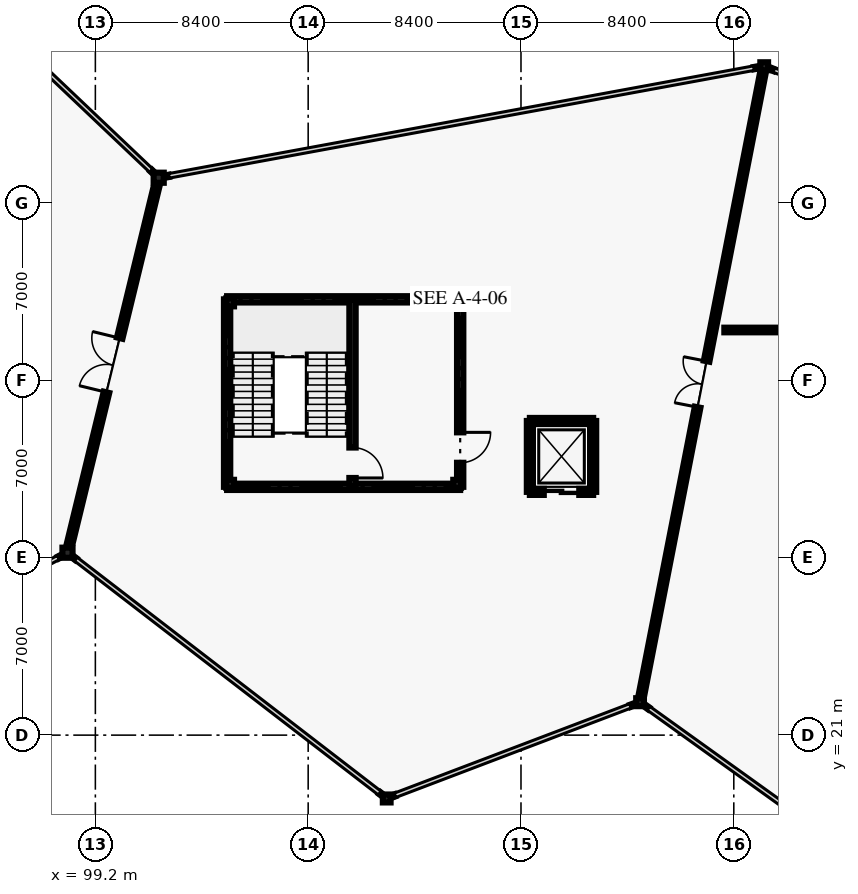
"""IFC4 building model, lengths in metres.
Left out: names, types, materials, properties, quantities, classifications, styles, units other than length and angle.
Written with IfcOpenShell. Run it as: python <this file> out.ifc"""

import sys

from ifc_helpers import new_model, si_unit, direction, frame, frame_2d, origin, origin_2d, place, context, subcontext, project, spatial, rectangle, i_section, extrude, element, fill, save


model = new_model("IFC4")
c1 = context("Model", 3, precision=1e-05, world=origin(), true_north=direction((0.0, 1.0)))
c2 = subcontext(c1, "Body", "Model", "MODEL_VIEW")
j1 = project(units=[si_unit("LENGTHUNIT", "METRE"), si_unit("PLANEANGLEUNIT", "RADIAN")], contexts=[c1])
p1 = place(None, origin())
s1 = spatial("IfcSite", under=j1, at=p1, CompositionType="ELEMENT")
p2 = place(p1, origin())
s2 = spatial("IfcBuilding", under=s1, at=p2, CompositionType="ELEMENT")
p3 = place(p2, frame((0.0, 0.0, 5.4)))
s3 = spatial("IfcBuildingStorey", under=s2, at=p3, CompositionType="ELEMENT", Elevation=5.4)
for number, where, z_axis, x_axis in (
    (1, (98.1, 28.2, 0.0), (0.0, 0.0, 1.0), (1.0, 0.0, 0.0)),
    (2, (101.7, 43.0, 0.0), (0.0, 0.0, 1.0), (1.0, 0.0, 0.0)),
):
    element("IfcColumn", number, at=place(p3, frame(where, z_axis=z_axis, x_axis=x_axis)), inside=s3, PredefinedType="COLUMN", context=c2, shape_type="SweptSolid", body=[
        extrude(i_section(OverallWidth=0.4, OverallDepth=0.4, WebThickness=0.022, FlangeThickness=0.036, at=origin_2d()), origin(), (0.0, 0.0, 1.0), 4.8),
    ])
for number, where, z_axis, x_axis in (
    (3, (110.7, 18.5, 0.0), (0.0, 0.0, 1.0), (1.0, 0.0, 0.0)),
    (4, (120.7, 22.3, 0.0), (0.0, 0.0, 1.0), (1.0, 0.0, 0.0)),
    (5, (125.6, 47.4, 0.0), (0.0, 0.0, 1.0), (1.0, 0.0, 0.0)),
    (6, (104.52, 30.92, 0.0), (0.0, 0.0, 1.0), (1.0, 0.0, 0.0)),
    (7, (113.48, 30.92, 0.0), (0.0, 0.0, 1.0), (1.0, 0.0, 0.0)),
    (8, (113.48, 38.08, 0.0), (0.0, 0.0, 1.0), (1.0, 0.0, 0.0)),
    (9, (104.52, 38.08, 0.0), (0.0, 0.0, 1.0), (1.0, 0.0, 0.0)),
):
    element("IfcColumn", number, at=place(p3, frame(where, z_axis=z_axis, x_axis=x_axis)), inside=s3, PredefinedType="COLUMN", context=c2, shape_type="SweptSolid", body=[
        extrude(i_section(OverallWidth=0.307, OverallDepth=0.315, WebThickness=0.012, FlangeThickness=0.019, FilletRadius=0.017, at=origin_2d()), origin(), (0.0, 0.0, 1.0), 4.8),
    ])
p4 = place(p3, frame((98.01, 28.152, 0.0), z_axis=(0.0, 0.0, 1.0), x_axis=(-0.885021600209, -0.465549962049, 0.0)))
e10 = element("IfcWall", 10, at=p4, inside=s3, PredefinedType="SOLIDWALL", context=c2, shape_type="SweptSolid", body=[
    extrude(rectangle(XDim=0.307, YDim=0.095, at=frame_2d((0.154, 0.0))), origin(), (0.0, 0.0, 1.0), 3.62),
])
p5 = place(p3, frame((101.403, 43.282, 0.0), z_axis=(0.0, 0.0, 1.0), x_axis=(0.726243974232, -0.687437044311, 0.0)))
e11 = element("IfcWall", 11, at=p5, inside=s3, PredefinedType="SOLIDWALL", context=c2, shape_type="SweptSolid", body=[
    extrude(rectangle(XDim=0.308, YDim=0.095, at=frame_2d((0.154, 0.0))), origin(), (0.0, 0.0, 1.0), 3.62),
])
p6 = place(p3, frame((110.667, 18.526, 0.0), z_axis=(0.0, 0.0, 1.0), x_axis=(-0.79356800352, 0.608481572268, 0.0)))
e12 = element("IfcWall", 12, at=p6, inside=s3, PredefinedType="SOLIDWALL", context=c2, shape_type="SweptSolid", body=[
    extrude(rectangle(XDim=0.307, YDim=0.095, at=frame_2d((0.154, 0.0))), origin(), (0.0, 0.0, 1.0), 3.62),
])
p7 = place(p3, frame((98.424, 27.95, 0.0), z_axis=(0.0, 0.0, 1.0), x_axis=(-0.793861838141, 0.608098168016, 0.0)))
e13 = element("IfcWall", 13, at=p7, inside=s3, PredefinedType="SOLIDWALL", context=c2, shape_type="SweptSolid", body=[
    extrude(rectangle(XDim=0.308, YDim=0.095, at=frame_2d((0.154, 0.0))), origin(), (0.0, 0.0, 1.0), 3.62),
])
p8 = place(p3, frame((120.605, 22.264, 0.0), z_axis=(0.0, 0.0, 1.0), x_axis=(-0.935413842844, -0.353554723651, 0.0)))
e14 = element("IfcWall", 14, at=p8, inside=s3, PredefinedType="SOLIDWALL", context=c2, shape_type="SweptSolid", body=[
    extrude(rectangle(XDim=0.308, YDim=0.095, at=frame_2d((0.154, 0.0))), origin(), (0.0, 0.0, 1.0), 3.62),
])
p9 = place(p3, frame((111.027, 18.624, 0.0), z_axis=(0.0, 0.0, 1.0), x_axis=(-0.935151489811, -0.354248064361, 0.0)))
e15 = element("IfcWall", 15, at=p9, inside=s3, PredefinedType="SOLIDWALL", context=c2, shape_type="SweptSolid", body=[
    extrude(rectangle(XDim=0.308, YDim=0.095, at=frame_2d((0.154, 0.0))), origin(), (0.0, 0.0, 1.0), 3.62),
])
for number, where, z_axis, x_axis in (
    (16, (101.8, 43.019, 0.0), (0.0, 0.0, 1.0), (0.984, 0.178, 0.0)),
    (17, (125.193, 47.325, 0.0), (0.0, 0.0, 1.0), (0.984, 0.178, 0.0)),
):
    element("IfcWall", number, at=place(p3, frame(where, z_axis=z_axis, x_axis=x_axis)), inside=s3, PredefinedType="SOLIDWALL", context=c2, shape_type="SweptSolid", body=[
        extrude(rectangle(XDim=0.308, YDim=0.095, at=frame_2d((0.154, 0.0))), origin(), (0.0, 0.0, 1.0), 3.62),
    ])
p10 = place(p3, frame((125.696, 47.363, 0.0), z_axis=(0.0, 0.0, 1.0), x_axis=(0.929292597209, -0.369344376933, 0.0)))
e18 = element("IfcWall", 18, at=p10, inside=s3, PredefinedType="SOLIDWALL", context=c2, shape_type="SweptSolid", body=[
    extrude(rectangle(XDim=0.309, YDim=0.095, at=frame_2d((0.154, 0.0))), origin(), (0.0, 0.0, 1.0), 3.62),
])
p11 = place(p3, frame((121.033, 22.061, 0.0), z_axis=(0.0, 0.0, 1.0), x_axis=(-0.811639565077, 0.584158554162, 0.0)))
e19 = element("IfcWall", 19, at=p11, inside=s3, PredefinedType="SOLIDWALL", context=c2, shape_type="SweptSolid", body=[
    extrude(rectangle(XDim=0.308, YDim=0.095, at=frame_2d((0.154, 0.0))), origin(), (0.0, 0.0, 1.0), 3.62),
])
p12 = place(p3, frame((98.1, 28.2, 0.0), z_axis=(0.0, 0.0, 1.0), x_axis=(0.236341762997, 0.971669990822, 0.0)))
e20 = element("IfcWall", 20, at=p12, inside=s3, PredefinedType="SOLIDWALL", context=c2, shape_type="SweptSolid", body=[
    extrude(rectangle(XDim=15.231, YDim=0.225, at=frame_2d((7.616, 0.0))), origin(), (0.0, 0.0, 1.0), 4.02),
])
p13 = place(p12, frame((6.516, 0.0, 0.0)))
e21 = element("IfcOpeningElement", 21, at=p13, cuts=e20, PredefinedType="OPENING", context=c2, shape_type="SweptSolid", body=[
    extrude(rectangle(XDim=2.2, YDim=2.6, at=frame_2d((1.1, 1.3))), frame((0.0, 0.123, 0.0), z_axis=(0.0, -1.0, 0.0), x_axis=(1.0, 0.0, 0.0)), (0.0, 0.0, 1.0), 0.245),
])
p14 = place(p3, frame((120.7, 22.3, 0.0), z_axis=(0.0, 0.0, 1.0), x_axis=(0.191608827438, 0.981471373626, 0.0)))
e22 = element("IfcWall", 22, at=p14, inside=s3, PredefinedType="SOLIDWALL", context=c2, shape_type="SweptSolid", body=[
    extrude(rectangle(XDim=25.574, YDim=0.225, at=frame_2d((12.787, 0.0))), origin(), (0.0, 0.0, 1.0), 4.02),
])
p15 = place(p14, frame((11.862, 0.0, 0.0)))
e23 = element("IfcOpeningElement", 23, at=p15, cuts=e22, PredefinedType="OPENING", context=c2, shape_type="SweptSolid", body=[
    extrude(rectangle(XDim=1.85, YDim=2.4, at=frame_2d((0.925, 1.2))), frame((0.0, 0.123, 0.0), z_axis=(0.0, -1.0, 0.0), x_axis=(1.0, 0.0, 0.0)), (0.0, 0.0, 1.0), 0.245),
])
p16 = place(p3, frame((124.026, 36.99, 0.0), z_axis=(0.0, 0.0, 1.0), x_axis=(1.0, 0.0, 0.0)))
e24 = element("IfcWall", 24, at=p16, inside=s3, PredefinedType="PARTITIONING", context=c2, shape_type="SweptSolid", body=[
    extrude(rectangle(XDim=14.812, YDim=0.185, at=frame_2d((7.406, 0.0))), origin(), (0.0, 0.0, 1.0), 3.32),
])
p17 = place(p16, frame((6.881, 0.0, 0.0)))
e25 = element("IfcOpeningElement", 25, at=p17, cuts=e24, PredefinedType="OPENING", context=c2, shape_type="SweptSolid", body=[
    extrude(rectangle(XDim=1.05, YDim=2.2, at=frame_2d((0.525, 1.1))), frame((0.0, 0.103, 0.0), z_axis=(0.0, -1.0, 0.0), x_axis=(1.0, 0.0, 0.0)), (0.0, 0.0, 1.0), 0.205),
])
p18 = place(p3, frame((104.4, 30.8, 0.0), z_axis=(0.0, 0.0, 1.0), x_axis=(0.0, 1.0, 0.0)))
e26 = element("IfcWall", 26, at=p18, inside=s3, PredefinedType="SHEAR", context=c2, shape_type="SweptSolid", body=[
    extrude(rectangle(XDim=7.4, YDim=0.25, at=frame_2d((3.7, 0.0))), origin(), (0.0, 0.0, 1.0), 4.56),
])
for number, where, z_axis, x_axis in (
    (27, (104.4, 38.2, 0.0), (0.0, 0.0, 1.0), (1.0, 0.0, 0.0)),
    (28, (113.6, 30.8, 0.0), (0.0, 0.0, 1.0), (-1.0, 0.0, 0.0)),
):
    element("IfcWall", number, at=place(p3, frame(where, z_axis=z_axis, x_axis=x_axis)), inside=s3, PredefinedType="SHEAR", context=c2, shape_type="SweptSolid", body=[
        extrude(rectangle(XDim=9.2, YDim=0.25, at=frame_2d((4.6, 0.0))), origin(), (0.0, 0.0, 1.0), 4.56),
    ])
p19 = place(p3, frame((113.6, 38.2, 0.0), z_axis=(0.0, 0.0, 1.0), x_axis=(0.0, -1.0, 0.0)))
e29 = element("IfcWall", 29, at=p19, inside=s3, PredefinedType="SHEAR", context=c2, shape_type="SweptSolid", body=[
    extrude(rectangle(XDim=7.4, YDim=0.25, at=frame_2d((3.7, 0.0))), origin(), (0.0, 0.0, 1.0), 4.56),
])
p20 = place(p19, frame((5.25, 0.0, 0.0)))
e30 = element("IfcOpeningElement", 30, at=p20, cuts=e29, PredefinedType="OPENING", context=c2, shape_type="SweptSolid", body=[
    extrude(rectangle(XDim=1.2, YDim=2.2, at=frame_2d((0.6, 1.1))), frame((0.0, 0.135, 0.0), z_axis=(0.0, -1.0, 0.0), x_axis=(1.0, 0.0, 0.0)), (0.0, 0.0, 1.0), 0.27),
])
p21 = place(p3, frame((109.35, 38.2, 0.0), z_axis=(0.0, 0.0, 1.0), x_axis=(0.0, -1.0, 0.0)))
e31 = element("IfcWall", 31, at=p21, inside=s3, PredefinedType="SHEAR", context=c2, shape_type="SweptSolid", body=[
    extrude(rectangle(XDim=7.4, YDim=0.25, at=frame_2d((3.7, 0.0))), origin(), (0.0, 0.0, 1.0), 4.56),
])
p22 = place(p21, frame((5.85, 0.0, 0.0)))
e32 = element("IfcOpeningElement", 32, at=p22, cuts=e31, PredefinedType="OPENING", context=c2, shape_type="SweptSolid", body=[
    extrude(rectangle(XDim=1.2, YDim=2.2, at=frame_2d((0.6, 1.1))), frame((0.0, 0.135, 0.0), z_axis=(0.0, -1.0, 0.0), x_axis=(1.0, 0.0, 0.0)), (0.0, 0.0, 1.0), 0.27),
])
p23 = place(p3, frame((116.35, 33.4, 0.0), z_axis=(0.0, 0.0, 1.0), x_axis=(1.0, 0.0, 0.0)))
e33 = element("IfcWall", 33, at=p23, inside=s3, PredefinedType="SHEAR", context=c2, shape_type="SweptSolid", body=[
    extrude(rectangle(XDim=2.5, YDim=0.24, at=frame_2d((1.25, 0.0))), origin(), (0.0, 0.0, 1.0), 4.56),
])
for number, where, z_axis, x_axis in (
    (34, (118.85, 33.4, 0.0), (0.0, 0.0, 1.0), (0.0, -1.0, 0.0)),
    (35, (116.35, 30.6, 0.0), (0.0, 0.0, 1.0), (0.0, 1.0, 0.0)),
):
    element("IfcWall", number, at=place(p3, frame(where, z_axis=z_axis, x_axis=x_axis)), inside=s3, PredefinedType="SHEAR", context=c2, shape_type="SweptSolid", body=[
        extrude(rectangle(XDim=2.8, YDim=0.24, at=frame_2d((1.4, 0.0))), origin(), (0.0, 0.0, 1.0), 4.56),
    ])
p24 = place(p3, frame((118.85, 30.6, 0.0), z_axis=(0.0, 0.0, 1.0), x_axis=(-1.0, 0.0, 0.0)))
e36 = element("IfcWall", 36, at=p24, inside=s3, PredefinedType="SHEAR", context=c2, shape_type="SweptSolid", body=[
    extrude(rectangle(XDim=2.5, YDim=0.24, at=frame_2d((1.25, 0.0))), origin(), (0.0, 0.0, 1.0), 4.56),
])
p25 = place(p24, frame((0.55, 0.0, 0.0)))
e37 = element("IfcOpeningElement", 37, at=p25, cuts=e36, PredefinedType="OPENING", context=c2, shape_type="SweptSolid", body=[
    extrude(rectangle(XDim=1.4, YDim=2.3, at=frame_2d((0.7, 1.15))), frame((0.0, 0.13, 0.0), z_axis=(0.0, -1.0, 0.0), x_axis=(1.0, 0.0, 0.0)), (0.0, 0.0, 1.0), 0.26),
])
p26 = place(p13, origin())
e38 = element("IfcDoor", 38, at=p26, inside=s3, OperationType="DOUBLE_DOOR_SINGLE_SWING", PredefinedType="DOOR", context=c2, shape_type="SweptSolid", body=[
    extrude(rectangle(XDim=2.2, YDim=2.6, at=frame_2d((1.1, 1.3))), frame((0.0, 0.025, 0.0), z_axis=(0.0, -1.0, 0.0), x_axis=(1.0, 0.0, 0.0)), (0.0, 0.0, 1.0), 0.05),
])
fill(e21, e38)
p27 = place(p15, origin())
e39 = element("IfcDoor", 39, at=p27, inside=s3, OperationType="DOUBLE_DOOR_SINGLE_SWING", PredefinedType="DOOR", context=c2, shape_type="SweptSolid", body=[
    extrude(rectangle(XDim=1.85, YDim=2.4, at=frame_2d((0.925, 1.2))), frame((0.0, 0.025, 0.0), z_axis=(0.0, -1.0, 0.0), x_axis=(1.0, 0.0, 0.0)), (0.0, 0.0, 1.0), 0.05),
])
fill(e23, e39)
p28 = place(p20, origin())
e40 = element("IfcDoor", 40, at=p28, inside=s3, OperationType="SINGLE_SWING_LEFT", PredefinedType="DOOR", context=c2, shape_type="SweptSolid", body=[
    extrude(rectangle(XDim=1.2, YDim=2.2, at=frame_2d((0.6, 1.1))), frame((0.0, 0.025, 0.0), z_axis=(0.0, -1.0, 0.0), x_axis=(1.0, 0.0, 0.0)), (0.0, 0.0, 1.0), 0.05),
])
fill(e30, e40)
p29 = place(p22, origin())
e41 = element("IfcDoor", 41, at=p29, inside=s3, OperationType="SINGLE_SWING_RIGHT", PredefinedType="DOOR", context=c2, shape_type="SweptSolid", body=[
    extrude(rectangle(XDim=1.2, YDim=2.2, at=frame_2d((0.6, 1.1))), frame((0.0, 0.025, 0.0), z_axis=(0.0, -1.0, 0.0), x_axis=(1.0, 0.0, 0.0)), (0.0, 0.0, 1.0), 0.05),
])
fill(e32, e41)
p30 = place(p25, origin())
e42 = element("IfcDoor", 42, at=p30, inside=s3, OperationType="SLIDING_TO_LEFT", PredefinedType="DOOR", context=c2, shape_type="SweptSolid", body=[
    extrude(rectangle(XDim=1.4, YDim=2.3, at=frame_2d((0.7, 1.15))), frame((0.0, 0.025, 0.0), z_axis=(0.0, -1.0, 0.0), x_axis=(1.0, 0.0, 0.0)), (0.0, 0.0, 1.0), 0.05),
])
fill(e37, e42)
save(model, sys.argv[1])
